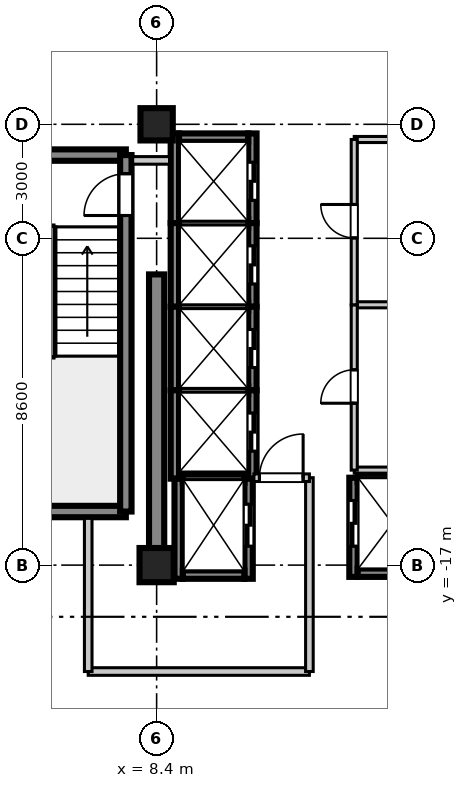
"""IFC4 building model, lengths in metres.
Left out: names, types, materials, properties, quantities, classifications, styles, units other than length and angle.
Written with IfcOpenShell. Run it as: python <this file> out.ifc"""

import sys

from ifc_helpers import new_model, si_unit, direction, frame, frame_2d, origin, origin_2d, place, context, subcontext, project, spatial, rectangle, extrude, source, transform, mapped, element, fill, save


model = new_model("IFC4")
c1 = context("Model", 3, precision=1e-05, world=origin(), true_north=direction((0.0, 1.0)))
c2 = subcontext(c1, "Body", "Model", "MODEL_VIEW")
j1 = project(units=[si_unit("LENGTHUNIT", "METRE"), si_unit("PLANEANGLEUNIT", "RADIAN")], contexts=[c1])
p1 = place(None, origin())
s1 = spatial("IfcSite", under=j1, at=p1, CompositionType="ELEMENT")
p2 = place(p1, origin())
s2 = spatial("IfcBuilding", under=s1, at=p2, CompositionType="ELEMENT")
p3 = place(p2, frame((0.0, 0.0, 288.8)))
s3 = spatial("IfcBuildingStorey", under=s2, at=p3, CompositionType="ELEMENT", Elevation=288.8)
m1 = source(origin(), c2, "Body", "SweptSolid", [
    extrude(rectangle(XDim=0.9, YDim=0.9, at=origin_2d()), origin(), (0.0, 0.0, 1.0), 3.805),
])
p4 = place(p3, frame((8.4, -17.0, 0.0), z_axis=(0.0, 0.0, 1.0), x_axis=(1.0, 0.0, 0.0)))
e1 = element("IfcColumn", 1, at=p4, inside=s3, PredefinedType="COLUMN", context=c2, shape_type="MappedRepresentation", body=[
    mapped(m1, transform((0.0, 0.0, 0.0), scale=1.0)),
])
m2 = source(origin(), c2, "Body", "SweptSolid", [
    extrude(rectangle(XDim=0.85, YDim=0.85, at=origin_2d()), origin(), (0.0, 0.0, 1.0), 3.805),
])
p5 = place(p3, frame((8.4, -5.4, 0.0), z_axis=(0.0, 0.0, 1.0), x_axis=(1.0, 0.0, 0.0)))
e2 = element("IfcColumn", 2, at=p5, inside=s3, PredefinedType="PILASTER", context=c2, shape_type="MappedRepresentation", body=[
    mapped(m2, transform((0.0, 0.0, 0.0), scale=1.0)),
])
m3 = source(origin(), c2, "Body", "SweptSolid", [
    extrude(rectangle(XDim=7.65, YDim=0.4, at=frame_2d((3.825, 0.0))), origin(), (0.0, 0.0, 1.0), 3.55),
])
p6 = place(p3, frame((8.4, -17.0, 0.0), z_axis=(0.0, 0.0, 1.0), x_axis=(0.0, 1.0, 0.0)))
e3 = element("IfcWall", 3, at=p6, inside=s3, PredefinedType="SHEAR", context=c2, shape_type="MappedRepresentation", body=[
    mapped(m3, transform((0.0, 0.0, 0.0), scale=1.0)),
])
m4 = source(origin(), c2, "Body", "SweptSolid", [
    extrude(rectangle(XDim=3.98, YDim=0.3, at=frame_2d((1.99, 0.0))), origin(), (0.0, 0.0, 1.0), 3.55),
])
for number, where, z_axis, x_axis in (
    (4, (3.61, -15.59, 0.0), (0.0, 0.0, 1.0), (1.0, 0.0, 0.0)),
    (5, (3.61, -6.21, 0.0), (0.0, 0.0, 1.0), (1.0, 0.0, 0.0)),
):
    element("IfcWall", number, at=place(p3, frame(where, z_axis=z_axis, x_axis=x_axis)), inside=s3, PredefinedType="SHEAR", context=c2, shape_type="MappedRepresentation", body=[
        mapped(m4, transform((0.0, 0.0, 0.0), scale=1.0)),
    ])
m5 = source(origin(), c2, "Body", "SweptSolid", [
    extrude(rectangle(XDim=9.38, YDim=0.3, at=frame_2d((4.69, 0.0))), origin(), (0.0, 0.0, 1.0), 3.55),
])
p7 = place(p3, frame((7.59, -15.59, 0.0), z_axis=(0.0, 0.0, 1.0), x_axis=(0.0, 1.0, 0.0)))
e6 = element("IfcWall", 6, at=p7, inside=s3, PredefinedType="SHEAR", context=c2, shape_type="MappedRepresentation", body=[
    mapped(m5, transform((0.0, 0.0, 0.0), scale=1.0)),
])
p8 = place(p7, frame((7.79, 0.0, 0.0)))
e7 = element("IfcOpeningElement", 7, at=p8, cuts=e6, PredefinedType="OPENING", context=c2, shape_type="SweptSolid", body=[
    extrude(rectangle(XDim=1.1, YDim=2.15, at=frame_2d((0.55, 1.075))), frame((0.0, 0.16, 0.0), z_axis=(0.0, -1.0, 0.0), x_axis=(1.0, 0.0, 0.0)), (0.0, 0.0, 1.0), 0.32),
])
m6 = source(origin(), c2, "Body", "SweptSolid", [
    extrude(rectangle(XDim=2.36, YDim=0.22, at=frame_2d((1.18, 0.0))), origin(), (0.0, 0.0, 1.0), 3.55),
])
p9 = place(p3, frame((8.88, -8.0, 0.0), z_axis=(0.0, 0.0, 1.0), x_axis=(0.0, 1.0, 0.0)))
e8 = element("IfcWall", 8, at=p9, inside=s3, PredefinedType="SHEAR", context=c2, shape_type="MappedRepresentation", body=[
    mapped(m6, transform((0.0, 0.0, 0.0), scale=1.0)),
])
p10 = place(p3, frame((10.92, -8.0, 0.0), z_axis=(0.0, 0.0, 1.0), x_axis=(0.0, 1.0, 0.0)))
e9 = element("IfcWall", 9, at=p10, inside=s3, PredefinedType="SHEAR", context=c2, shape_type="MappedRepresentation", body=[
    mapped(m6, transform((0.0, 0.0, 0.0), scale=1.0)),
])
p11 = place(p10, frame((0.6, 0.0, 0.0)))
e10 = element("IfcOpeningElement", 10, at=p11, cuts=e9, PredefinedType="OPENING", context=c2, shape_type="SweptSolid", body=[
    extrude(rectangle(XDim=1.0, YDim=2.2, at=frame_2d((0.5, 1.1))), frame((0.0, 0.12, 0.0), z_axis=(0.0, -1.0, 0.0), x_axis=(1.0, 0.0, 0.0)), (0.0, 0.0, 1.0), 0.24),
])
m7 = source(origin(), c2, "Body", "SweptSolid", [
    extrude(rectangle(XDim=1.82, YDim=0.22, at=frame_2d((0.91, 0.0))), origin(), (0.0, 0.0, 1.0), 3.55),
])
p12 = place(p3, frame((8.99, -5.75, 0.0), z_axis=(0.0, 0.0, 1.0), x_axis=(1.0, 0.0, 0.0)))
e11 = element("IfcWall", 11, at=p12, inside=s3, PredefinedType="SHEAR", context=c2, shape_type="MappedRepresentation", body=[
    mapped(m7, transform((0.0, 0.0, 0.0), scale=1.0)),
])
m8 = source(origin(), c2, "Body", "SweptSolid", [
    extrude(rectangle(XDim=2.2, YDim=0.22, at=frame_2d((1.1, 0.0))), origin(), (0.0, 0.0, 1.0), 3.55),
])
p13 = place(p3, frame((8.88, -10.2, 0.0), z_axis=(0.0, 0.0, 1.0), x_axis=(0.0, 1.0, 0.0)))
e12 = element("IfcWall", 12, at=p13, inside=s3, PredefinedType="SHEAR", context=c2, shape_type="MappedRepresentation", body=[
    mapped(m8, transform((0.0, 0.0, 0.0), scale=1.0)),
])
p14 = place(p3, frame((10.92, -10.2, 0.0), z_axis=(0.0, 0.0, 1.0), x_axis=(0.0, 1.0, 0.0)))
e13 = element("IfcWall", 13, at=p14, inside=s3, PredefinedType="SHEAR", context=c2, shape_type="MappedRepresentation", body=[
    mapped(m8, transform((0.0, 0.0, 0.0), scale=1.0)),
])
p15 = place(p14, frame((0.6, 0.0, 0.0)))
e14 = element("IfcOpeningElement", 14, at=p15, cuts=e13, PredefinedType="OPENING", context=c2, shape_type="SweptSolid", body=[
    extrude(rectangle(XDim=1.0, YDim=2.2, at=frame_2d((0.5, 1.1))), frame((0.0, 0.12, 0.0), z_axis=(0.0, -1.0, 0.0), x_axis=(1.0, 0.0, 0.0)), (0.0, 0.0, 1.0), 0.24),
])
m9 = source(origin(), c2, "Body", "SweptSolid", [
    extrude(rectangle(XDim=1.82, YDim=0.22, at=frame_2d((0.91, 0.0))), origin(), (0.0, 0.0, 1.0), 3.85),
])
p16 = place(p3, frame((8.99, -8.0, 0.0), z_axis=(0.0, 0.0, 1.0), x_axis=(1.0, 0.0, 0.0)))
e15 = element("IfcWall", 15, at=p16, inside=s3, PredefinedType="SHEAR", context=c2, shape_type="MappedRepresentation", body=[
    mapped(m9, transform((0.0, 0.0, 0.0), scale=1.0)),
])
p17 = place(p3, frame((8.88, -12.4, 0.0), z_axis=(0.0, 0.0, 1.0), x_axis=(0.0, 1.0, 0.0)))
e16 = element("IfcWall", 16, at=p17, inside=s3, PredefinedType="SHEAR", context=c2, shape_type="MappedRepresentation", body=[
    mapped(m8, transform((0.0, 0.0, 0.0), scale=1.0)),
])
p18 = place(p3, frame((10.92, -12.4, 0.0), z_axis=(0.0, 0.0, 1.0), x_axis=(0.0, 1.0, 0.0)))
e17 = element("IfcWall", 17, at=p18, inside=s3, PredefinedType="SHEAR", context=c2, shape_type="MappedRepresentation", body=[
    mapped(m8, transform((0.0, 0.0, 0.0), scale=1.0)),
])
p19 = place(p18, frame((0.6, 0.0, 0.0)))
e18 = element("IfcOpeningElement", 18, at=p19, cuts=e17, PredefinedType="OPENING", context=c2, shape_type="SweptSolid", body=[
    extrude(rectangle(XDim=1.0, YDim=2.2, at=frame_2d((0.5, 1.1))), frame((0.0, 0.12, 0.0), z_axis=(0.0, -1.0, 0.0), x_axis=(1.0, 0.0, 0.0)), (0.0, 0.0, 1.0), 0.24),
])
p20 = place(p3, frame((8.99, -10.2, 0.0), z_axis=(0.0, 0.0, 1.0), x_axis=(1.0, 0.0, 0.0)))
e19 = element("IfcWall", 19, at=p20, inside=s3, PredefinedType="SHEAR", context=c2, shape_type="MappedRepresentation", body=[
    mapped(m9, transform((0.0, 0.0, 0.0), scale=1.0)),
])
m10 = source(origin(), c2, "Body", "SweptSolid", [
    extrude(rectangle(XDim=2.325, YDim=0.22, at=frame_2d((1.163, 0.0))), origin(), (0.0, 0.0, 1.0), 3.55),
])
p21 = place(p3, frame((8.88, -14.725, 0.0), z_axis=(0.0, 0.0, 1.0), x_axis=(0.0, 1.0, 0.0)))
e20 = element("IfcWall", 20, at=p21, inside=s3, PredefinedType="SHEAR", context=c2, shape_type="MappedRepresentation", body=[
    mapped(m10, transform((0.0, 0.0, 0.0), scale=1.0)),
])
p22 = place(p3, frame((10.92, -14.725, 0.0), z_axis=(0.0, 0.0, 1.0), x_axis=(0.0, 1.0, 0.0)))
e21 = element("IfcWall", 21, at=p22, inside=s3, PredefinedType="SHEAR", context=c2, shape_type="MappedRepresentation", body=[
    mapped(m10, transform((0.0, 0.0, 0.0), scale=1.0)),
])
p23 = place(p22, frame((0.725, 0.0, 0.0)))
e22 = element("IfcOpeningElement", 22, at=p23, cuts=e21, PredefinedType="OPENING", context=c2, shape_type="SweptSolid", body=[
    extrude(rectangle(XDim=1.0, YDim=2.2, at=frame_2d((0.5, 1.1))), frame((0.0, 0.12, 0.0), z_axis=(0.0, -1.0, 0.0), x_axis=(1.0, 0.0, 0.0)), (0.0, 0.0, 1.0), 0.24),
])
p24 = place(p3, frame((8.99, -12.4, 0.0), z_axis=(0.0, 0.0, 1.0), x_axis=(1.0, 0.0, 0.0)))
e23 = element("IfcWall", 23, at=p24, inside=s3, PredefinedType="SHEAR", context=c2, shape_type="MappedRepresentation", body=[
    mapped(m9, transform((0.0, 0.0, 0.0), scale=1.0)),
])
m11 = source(origin(), c2, "Body", "SweptSolid", [
    extrude(rectangle(XDim=2.635, YDim=0.22, at=frame_2d((1.317, 0.0))), origin(), (0.0, 0.0, 1.0), 3.55),
])
p25 = place(p3, frame((8.98, -17.36, 0.0), z_axis=(0.0, 0.0, 1.0), x_axis=(0.0, 1.0, 0.0)))
e24 = element("IfcWall", 24, at=p25, inside=s3, PredefinedType="SHEAR", context=c2, shape_type="MappedRepresentation", body=[
    mapped(m11, transform((0.0, 0.0, 0.0), scale=1.0)),
])
p26 = place(p3, frame((10.82, -17.36, 0.0), z_axis=(0.0, 0.0, 1.0), x_axis=(0.0, 1.0, 0.0)))
e25 = element("IfcWall", 25, at=p26, inside=s3, PredefinedType="SHEAR", context=c2, shape_type="MappedRepresentation", body=[
    mapped(m11, transform((0.0, 0.0, 0.0), scale=1.0)),
])
p27 = place(p26, frame((0.86, 0.0, 0.0)))
e26 = element("IfcOpeningElement", 26, at=p27, cuts=e25, PredefinedType="OPENING", context=c2, shape_type="SweptSolid", body=[
    extrude(rectangle(XDim=1.1, YDim=2.2, at=frame_2d((0.55, 1.1))), frame((0.0, 0.12, 0.0), z_axis=(0.0, -1.0, 0.0), x_axis=(1.0, 0.0, 0.0)), (0.0, 0.0, 1.0), 0.24),
])
m12 = source(origin(), c2, "Body", "SweptSolid", [
    extrude(rectangle(XDim=1.62, YDim=0.22, at=frame_2d((0.81, 0.0))), origin(), (0.0, 0.0, 1.0), 3.55),
])
p28 = place(p3, frame((9.09, -17.25, 0.0), z_axis=(0.0, 0.0, 1.0), x_axis=(1.0, 0.0, 0.0)))
e27 = element("IfcWall", 27, at=p28, inside=s3, PredefinedType="SHEAR", context=c2, shape_type="MappedRepresentation", body=[
    mapped(m12, transform((0.0, 0.0, 0.0), scale=1.0)),
])
m13 = source(origin(), c2, "Body", "SweptSolid", [
    extrude(rectangle(XDim=1.62, YDim=0.22, at=frame_2d((0.81, 0.0))), origin(), (0.0, 0.0, 1.0), 3.85),
])
p29 = place(p3, frame((9.09, -14.725, 0.0), z_axis=(0.0, 0.0, 1.0), x_axis=(1.0, 0.0, 0.0)))
e28 = element("IfcWall", 28, at=p29, inside=s3, PredefinedType="SHEAR", context=c2, shape_type="MappedRepresentation", body=[
    mapped(m13, transform((0.0, 0.0, 0.0), scale=1.0)),
])
m14 = source(origin(), c2, "Body", "SweptSolid", [
    extrude(rectangle(XDim=2.61, YDim=0.22, at=frame_2d((1.305, 0.0))), origin(), (0.0, 0.0, 1.0), 3.55),
])
p30 = place(p3, frame((13.58, -17.31, 0.0), z_axis=(0.0, 0.0, 1.0), x_axis=(0.0, 1.0, 0.0)))
e29 = element("IfcWall", 29, at=p30, inside=s3, PredefinedType="SHEAR", context=c2, shape_type="MappedRepresentation", body=[
    mapped(m14, transform((0.0, 0.0, 0.0), scale=1.0)),
])
p31 = place(p30, frame((0.81, 0.0, 0.0)))
e30 = element("IfcOpeningElement", 30, at=p31, cuts=e29, PredefinedType="OPENING", context=c2, shape_type="SweptSolid", body=[
    extrude(rectangle(XDim=1.2, YDim=2.2, at=frame_2d((0.6, 1.1))), frame((0.0, 0.12, 0.0), z_axis=(0.0, -1.0, 0.0), x_axis=(1.0, 0.0, 0.0)), (0.0, 0.0, 1.0), 0.24),
])
p32 = place(p3, frame((13.69, -17.2, 0.0), z_axis=(0.0, 0.0, 1.0), x_axis=(1.0, 0.0, 0.0)))
e31 = element("IfcWall", 31, at=p32, inside=s3, PredefinedType="SHEAR", context=c2, shape_type="MappedRepresentation", body=[
    mapped(m7, transform((0.0, 0.0, 0.0), scale=1.0)),
])
p33 = place(p3, frame((13.69, -14.7, 0.0), z_axis=(0.0, 0.0, 1.0), x_axis=(1.0, 0.0, 0.0)))
e32 = element("IfcWall", 32, at=p33, inside=s3, PredefinedType="SHEAR", context=c2, shape_type="MappedRepresentation", body=[
    mapped(m9, transform((0.0, 0.0, 0.0), scale=1.0)),
])
m15 = source(origin(), c2, "Body", "SweptSolid", [
    extrude(rectangle(XDim=5.82, YDim=0.2, at=frame_2d((2.91, 0.0))), origin(), (0.0, 0.0, 1.0), 2.89),
])
p34 = place(p3, frame((6.6, -19.8, 0.0), z_axis=(0.0, 0.0, 1.0), x_axis=(1.0, 0.0, 0.0)))
e33 = element("IfcWall", 33, at=p34, inside=s3, PredefinedType="PARTITIONING", context=c2, shape_type="MappedRepresentation", body=[
    mapped(m15, transform((0.0, 0.0, 0.0), scale=1.0)),
])
m16 = source(origin(), c2, "Body", "SweptSolid", [
    extrude(rectangle(XDim=4.03, YDim=0.2, at=frame_2d((2.015, 0.0))), origin(), (0.0, 0.0, 1.0), 2.89),
])
p35 = place(p3, frame((6.6, -19.8, 0.0), z_axis=(0.0, 0.0, 1.0), x_axis=(0.0, 1.0, 0.0)))
e34 = element("IfcWall", 34, at=p35, inside=s3, PredefinedType="PARTITIONING", context=c2, shape_type="MappedRepresentation", body=[
    mapped(m16, transform((0.0, 0.0, 0.0), scale=1.0)),
])
m17 = source(origin(), c2, "Body", "SweptSolid", [
    extrude(rectangle(XDim=5.1, YDim=0.2, at=frame_2d((2.55, 0.0))), origin(), (0.0, 0.0, 1.0), 2.89),
])
p36 = place(p3, frame((12.42, -19.8, 0.0), z_axis=(0.0, 0.0, 1.0), x_axis=(0.0, 1.0, 0.0)))
e35 = element("IfcWall", 35, at=p36, inside=s3, PredefinedType="PARTITIONING", context=c2, shape_type="MappedRepresentation", body=[
    mapped(m17, transform((0.0, 0.0, 0.0), scale=1.0)),
])
m18 = source(origin(), c2, "Body", "SweptSolid", [
    extrude(rectangle(XDim=1.46, YDim=0.2, at=frame_2d((0.73, 0.0))), origin(), (0.0, 0.0, 1.0), 2.89),
])
p37 = place(p3, frame((10.96, -14.7, 0.0), z_axis=(0.0, 0.0, 1.0), x_axis=(1.0, 0.0, 0.0)))
e36 = element("IfcWall", 36, at=p37, inside=s3, PredefinedType="PARTITIONING", context=c2, shape_type="MappedRepresentation", body=[
    mapped(m18, transform((0.0, 0.0, 0.0), scale=1.0)),
])
p38 = place(p37, frame((0.145, 0.0, 0.0)))
e37 = element("IfcOpeningElement", 37, at=p38, cuts=e36, PredefinedType="OPENING", context=c2, shape_type="SweptSolid", body=[
    extrude(rectangle(XDim=1.15, YDim=2.15, at=frame_2d((0.575, 1.075))), frame((0.0, 0.11, 0.0), z_axis=(0.0, -1.0, 0.0), x_axis=(1.0, 0.0, 0.0)), (0.0, 0.0, 1.0), 0.22),
])
m19 = source(origin(), c2, "Body", "SweptSolid", [
    extrude(rectangle(XDim=0.97, YDim=0.2, at=frame_2d((0.485, 0.0))), origin(), (0.0, 0.0, 1.0), 2.89),
])
p39 = place(p3, frame((7.77, -6.35, 0.0), z_axis=(0.0, 0.0, 1.0), x_axis=(1.0, 0.0, 0.0)))
e38 = element("IfcWall", 38, at=p39, inside=s3, PredefinedType="PARTITIONING", context=c2, shape_type="MappedRepresentation", body=[
    mapped(m19, transform((0.0, 0.0, 0.0), scale=1.0)),
])
m20 = source(origin(), c2, "Body", "SweptSolid", [
    extrude(rectangle(XDim=2.05, YDim=0.16, at=frame_2d((1.025, 0.0))), origin(), (0.0, 0.0, 1.0), 2.89),
])
for number, where, z_axis, x_axis in (
    (39, (13.6, -14.5, 0.0), (0.0, 0.0, 1.0), (1.0, 0.0, 0.0)),
    (40, (13.6, -10.15, 0.0), (0.0, 0.0, 1.0), (1.0, 0.0, 0.0)),
):
    element("IfcWall", number, at=place(p3, frame(where, z_axis=z_axis, x_axis=x_axis)), inside=s3, PredefinedType="PARTITIONING", context=c2, shape_type="MappedRepresentation", body=[
        mapped(m20, transform((0.0, 0.0, 0.0), scale=1.0)),
    ])
m21 = source(origin(), c2, "Body", "SweptSolid", [
    extrude(rectangle(XDim=4.35, YDim=0.16, at=frame_2d((2.175, 0.0))), origin(), (0.0, 0.0, 1.0), 2.89),
])
p40 = place(p3, frame((13.6, -14.5, 0.0), z_axis=(0.0, 0.0, 1.0), x_axis=(0.0, 1.0, 0.0)))
e41 = element("IfcWall", 41, at=p40, inside=s3, PredefinedType="PARTITIONING", context=c2, shape_type="MappedRepresentation", body=[
    mapped(m21, transform((0.0, 0.0, 0.0), scale=1.0)),
])
p41 = place(p40, frame((1.76, 0.0, 0.0)))
e42 = element("IfcOpeningElement", 42, at=p41, cuts=e41, PredefinedType="OPENING", context=c2, shape_type="SweptSolid", body=[
    extrude(rectangle(XDim=0.88, YDim=2.1, at=frame_2d((0.44, 1.05))), frame((0.0, 0.09, 0.0), z_axis=(0.0, -1.0, 0.0), x_axis=(1.0, 0.0, 0.0)), (0.0, 0.0, 1.0), 0.18),
])
p42 = place(p3, frame((13.6, -5.8, 0.0), z_axis=(0.0, 0.0, 1.0), x_axis=(1.0, 0.0, 0.0)))
e43 = element("IfcWall", 43, at=p42, inside=s3, PredefinedType="PARTITIONING", context=c2, shape_type="MappedRepresentation", body=[
    mapped(m20, transform((0.0, 0.0, 0.0), scale=1.0)),
])
m22 = source(origin(), c2, "Body", "SweptSolid", [
    extrude(rectangle(XDim=4.35, YDim=0.16, at=frame_2d((2.175, 0.0))), origin(), (0.0, 0.0, 1.0), 2.89),
])
p43 = place(p3, frame((13.6, -10.15, 0.0), z_axis=(0.0, 0.0, 1.0), x_axis=(0.0, 1.0, 0.0)))
e44 = element("IfcWall", 44, at=p43, inside=s3, PredefinedType="PARTITIONING", context=c2, shape_type="MappedRepresentation", body=[
    mapped(m22, transform((0.0, 0.0, 0.0), scale=1.0)),
])
p44 = place(p43, frame((1.76, 0.0, 0.0)))
e45 = element("IfcOpeningElement", 45, at=p44, cuts=e44, PredefinedType="OPENING", context=c2, shape_type="SweptSolid", body=[
    extrude(rectangle(XDim=0.88, YDim=2.1, at=frame_2d((0.44, 1.05))), frame((0.0, 0.09, 0.0), z_axis=(0.0, -1.0, 0.0), x_axis=(1.0, 0.0, 0.0)), (0.0, 0.0, 1.0), 0.18),
])
m23 = source(origin(), c2, "Body", "SweptSolid", [
    extrude(rectangle(XDim=1.1, YDim=2.15, at=frame_2d((0.55, 1.075))), frame((0.0, 0.025, 0.0), z_axis=(0.0, -1.0, 0.0), x_axis=(1.0, 0.0, 0.0)), (0.0, 0.0, 1.0), 0.05),
])
p45 = place(p8, origin())
e46 = element("IfcDoor", 46, at=p45, inside=s3, OperationType="SINGLE_SWING_LEFT", PredefinedType="DOOR", context=c2, shape_type="MappedRepresentation", body=[
    mapped(m23, transform((0.0, 0.0, 0.0), scale=1.0)),
])
fill(e7, e46)
m24 = source(origin(), c2, "Body", "SweptSolid", [
    extrude(rectangle(XDim=1.0, YDim=2.2, at=frame_2d((0.5, 1.1))), frame((0.0, 0.025, 0.0), z_axis=(0.0, -1.0, 0.0), x_axis=(1.0, 0.0, 0.0)), (0.0, 0.0, 1.0), 0.05),
])
p46 = place(p11, frame((1.0, 0.0, 0.0), z_axis=(0.0, 0.0, 1.0), x_axis=(-1.0, 0.0, 0.0)))
e47 = element("IfcDoor", 47, at=p46, inside=s3, OperationType="DOUBLE_DOOR_SLIDING", PredefinedType="DOOR", context=c2, shape_type="MappedRepresentation", body=[
    mapped(m24, transform((0.0, 0.0, 0.0), scale=1.0)),
])
fill(e10, e47)
p47 = place(p15, frame((1.0, 0.0, 0.0), z_axis=(0.0, 0.0, 1.0), x_axis=(-1.0, 0.0, 0.0)))
e48 = element("IfcDoor", 48, at=p47, inside=s3, OperationType="DOUBLE_DOOR_SLIDING", PredefinedType="DOOR", context=c2, shape_type="MappedRepresentation", body=[
    mapped(m24, transform((0.0, 0.0, 0.0), scale=1.0)),
])
fill(e14, e48)
p48 = place(p19, frame((1.0, 0.0, 0.0), z_axis=(0.0, 0.0, 1.0), x_axis=(-1.0, 0.0, 0.0)))
e49 = element("IfcDoor", 49, at=p48, inside=s3, OperationType="DOUBLE_DOOR_SLIDING", PredefinedType="DOOR", context=c2, shape_type="MappedRepresentation", body=[
    mapped(m24, transform((0.0, 0.0, 0.0), scale=1.0)),
])
fill(e18, e49)
p49 = place(p23, frame((1.0, 0.0, 0.0), z_axis=(0.0, 0.0, 1.0), x_axis=(-1.0, 0.0, 0.0)))
e50 = element("IfcDoor", 50, at=p49, inside=s3, OperationType="DOUBLE_DOOR_SLIDING", PredefinedType="DOOR", context=c2, shape_type="MappedRepresentation", body=[
    mapped(m24, transform((0.0, 0.0, 0.0), scale=1.0)),
])
fill(e22, e50)
m25 = source(origin(), c2, "Body", "SweptSolid", [
    extrude(rectangle(XDim=1.1, YDim=2.2, at=frame_2d((0.55, 1.1))), frame((0.0, 0.025, 0.0), z_axis=(0.0, -1.0, 0.0), x_axis=(1.0, 0.0, 0.0)), (0.0, 0.0, 1.0), 0.05),
])
p50 = place(p27, frame((1.1, 0.0, 0.0), z_axis=(0.0, 0.0, 1.0), x_axis=(-1.0, 0.0, 0.0)))
e51 = element("IfcDoor", 51, at=p50, inside=s3, OperationType="DOUBLE_DOOR_SLIDING", PredefinedType="DOOR", context=c2, shape_type="MappedRepresentation", body=[
    mapped(m25, transform((0.0, 0.0, 0.0), scale=1.0)),
])
fill(e26, e51)
m26 = source(origin(), c2, "Body", "SweptSolid", [
    extrude(rectangle(XDim=1.2, YDim=2.2, at=frame_2d((0.6, 1.1))), frame((0.0, 0.025, 0.0), z_axis=(0.0, -1.0, 0.0), x_axis=(1.0, 0.0, 0.0)), (0.0, 0.0, 1.0), 0.05),
])
p51 = place(p31, origin())
e52 = element("IfcDoor", 52, at=p51, inside=s3, OperationType="DOUBLE_DOOR_SLIDING", PredefinedType="DOOR", context=c2, shape_type="MappedRepresentation", body=[
    mapped(m26, transform((0.0, 0.0, 0.0), scale=1.0)),
])
fill(e30, e52)
m27 = source(origin(), c2, "Body", "SweptSolid", [
    extrude(rectangle(XDim=1.15, YDim=2.15, at=frame_2d((0.575, 1.075))), frame((0.0, 0.025, 0.0), z_axis=(0.0, -1.0, 0.0), x_axis=(1.0, 0.0, 0.0)), (0.0, 0.0, 1.0), 0.05),
])
p52 = place(p38, origin())
e53 = element("IfcDoor", 53, at=p52, inside=s3, OperationType="SINGLE_SWING_RIGHT", PredefinedType="DOOR", context=c2, shape_type="MappedRepresentation", body=[
    mapped(m27, transform((0.0, 0.0, 0.0), scale=1.0)),
])
fill(e37, e53)
m28 = source(origin(), c2, "Body", "SweptSolid", [
    extrude(rectangle(XDim=0.88, YDim=2.1, at=frame_2d((0.44, 1.05))), frame((0.0, 0.025, 0.0), z_axis=(0.0, -1.0, 0.0), x_axis=(1.0, 0.0, 0.0)), (0.0, 0.0, 1.0), 0.05),
])
p53 = place(p41, frame((0.88, 0.0, 0.0), z_axis=(0.0, 0.0, 1.0), x_axis=(-1.0, 0.0, 0.0)))
e54 = element("IfcDoor", 54, at=p53, inside=s3, OperationType="SINGLE_SWING_LEFT", PredefinedType="DOOR", context=c2, shape_type="MappedRepresentation", body=[
    mapped(m28, transform((0.0, 0.0, 0.0), scale=1.0)),
])
fill(e42, e54)
p54 = place(p44, frame((0.88, 0.0, 0.0), z_axis=(0.0, 0.0, 1.0), x_axis=(-1.0, 0.0, 0.0)))
e55 = element("IfcDoor", 55, at=p54, inside=s3, OperationType="SINGLE_SWING_RIGHT", PredefinedType="DOOR", context=c2, shape_type="MappedRepresentation", body=[
    mapped(m28, transform((0.0, 0.0, 0.0), scale=1.0)),
])
fill(e45, e55)
save(model, sys.argv[1])
